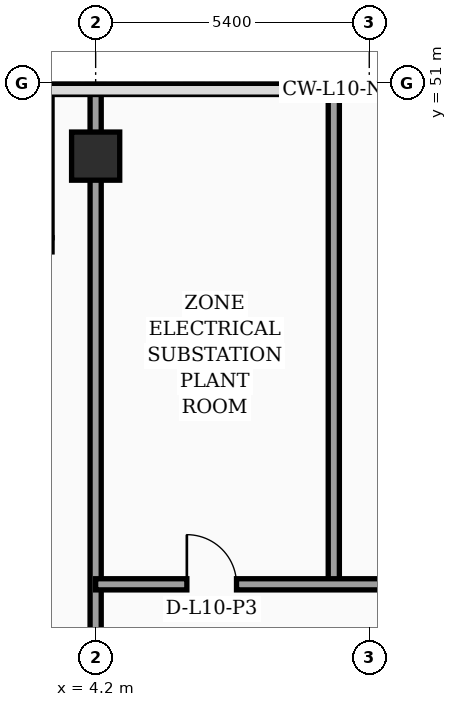
"""IFC4 building model, lengths in metres.
Left out: names, types, materials, properties, quantities, classifications, styles, units other than length and angle.
Written with IfcOpenShell. Run it as: python <this file> out.ifc"""

import sys

from ifc_helpers import new_model, si_unit, direction, frame, frame_2d, origin, origin_2d, place, context, subcontext, project, spatial, rectangle, hollow_rectangle, extrude, element, fill, save


model = new_model("IFC4")
c1 = context("Model", 3, precision=1e-05, world=origin(), true_north=direction((0.0, 1.0)))
c2 = subcontext(c1, "Body", "Model", "MODEL_VIEW")
j1 = project(units=[si_unit("LENGTHUNIT", "METRE"), si_unit("PLANEANGLEUNIT", "RADIAN")], contexts=[c1])
p1 = place(None, origin())
s1 = spatial("IfcSite", under=j1, at=p1, CompositionType="ELEMENT")
p2 = place(p1, origin())
s2 = spatial("IfcBuilding", under=s1, at=p2, CompositionType="ELEMENT")
p3 = place(p2, frame((0.0, 0.0, 46.0)))
s3 = spatial("IfcBuildingStorey", under=s2, at=p3, CompositionType="ELEMENT", Elevation=46.0)
p4 = place(p3, frame((4.2, 49.55, 0.0), z_axis=(0.0, 0.0, 1.0), x_axis=(1.0, 0.0, 0.0)))
e1 = element("IfcColumn", 1, at=p4, inside=s3, PredefinedType="COLUMN", context=c2, shape_type="SweptSolid", body=[
    extrude(hollow_rectangle(XDim=0.95, YDim=0.95, WallThickness=0.04, at=origin_2d()), origin(), (0.0, 0.0, 1.0), 4.56),
])
p5 = place(p3, frame((3.34, 47.8, 0.0), z_axis=(0.0, 0.0, 1.0), x_axis=(-1.0, 0.0, 0.0)))
e2 = element("IfcWall", 2, at=p5, inside=s3, PredefinedType="SOLIDWALL", context=c2, shape_type="SweptSolid", body=[
    extrude(rectangle(XDim=3.22, YDim=0.28, at=frame_2d((1.61, 0.0))), origin(), (0.0, 0.0, 1.0), 4.04),
])
p6 = place(p3, frame((4.2, 38.95, 0.0), z_axis=(0.0, 0.0, 1.0), x_axis=(0.0, 1.0, 0.0)))
e3 = element("IfcWall", 3, at=p6, inside=s3, PredefinedType="SOLIDWALL", context=c2, shape_type="SweptSolid", body=[
    extrude(rectangle(XDim=11.99, YDim=0.22, at=frame_2d((5.995, 0.0))), origin(), (0.0, 0.0, 1.0), 3.84),
])
p7 = place(p3, frame((8.9, 41.1, 0.0), z_axis=(0.0, 0.0, 1.0), x_axis=(0.0, 1.0, 0.0)))
e4 = element("IfcWall", 4, at=p7, inside=s3, PredefinedType="SOLIDWALL", context=c2, shape_type="SweptSolid", body=[
    extrude(rectangle(XDim=9.84, YDim=0.22, at=frame_2d((4.92, 0.0))), origin(), (0.0, 0.0, 1.0), 4.04),
])
p8 = place(p3, frame((4.2, 41.1, 0.0), z_axis=(0.0, 0.0, 1.0), x_axis=(1.0, 0.0, 0.0)))
e5 = element("IfcWall", 5, at=p8, inside=s3, PredefinedType="SOLIDWALL", context=c2, shape_type="SweptSolid", body=[
    extrude(rectangle(XDim=13.65, YDim=0.22, at=frame_2d((6.825, 0.0))), origin(), (0.0, 0.0, 1.0), 3.84),
])
p9 = place(p8, frame((1.8, 0.0, 0.0)))
e6 = element("IfcOpeningElement", 6, at=p9, cuts=e5, PredefinedType="OPENING", context=c2, shape_type="SweptSolid", body=[
    extrude(rectangle(XDim=0.98, YDim=2.15, at=frame_2d((0.49, 1.075))), frame((0.0, 0.12, 0.0), z_axis=(0.0, -1.0, 0.0), x_axis=(1.0, 0.0, 0.0)), (0.0, 0.0, 1.0), 0.24),
])
p10 = place(p8, frame((6.8, 0.0, 0.0)))
e7 = element("IfcOpeningElement", 7, at=p10, cuts=e5, PredefinedType="OPENING", context=c2, shape_type="SweptSolid", body=[
    extrude(rectangle(XDim=1.15, YDim=2.2, at=frame_2d((0.575, 1.1))), frame((0.0, 0.12, 0.0), z_axis=(0.0, -1.0, 0.0), x_axis=(1.0, 0.0, 0.0)), (0.0, 0.0, 1.0), 0.24),
])
p11 = place(p8, frame((11.35, 0.0, 0.0)))
e8 = element("IfcOpeningElement", 8, at=p11, cuts=e5, PredefinedType="OPENING", context=c2, shape_type="SweptSolid", body=[
    extrude(rectangle(XDim=1.02, YDim=2.2, at=frame_2d((0.51, 1.1))), frame((0.0, 0.12, 0.0), z_axis=(0.0, -1.0, 0.0), x_axis=(1.0, 0.0, 0.0)), (0.0, 0.0, 1.0), 0.24),
])
p12 = place(p9, origin())
e9 = element("IfcDoor", 9, at=p12, inside=s3, OperationType="SINGLE_SWING_LEFT", PredefinedType="DOOR", context=c2, shape_type="SweptSolid", body=[
    extrude(rectangle(XDim=0.98, YDim=2.15, at=frame_2d((0.49, 1.075))), frame((0.0, 0.025, 0.0), z_axis=(0.0, -1.0, 0.0), x_axis=(1.0, 0.0, 0.0)), (0.0, 0.0, 1.0), 0.05),
])
fill(e6, e9)
save(model, sys.argv[1])
